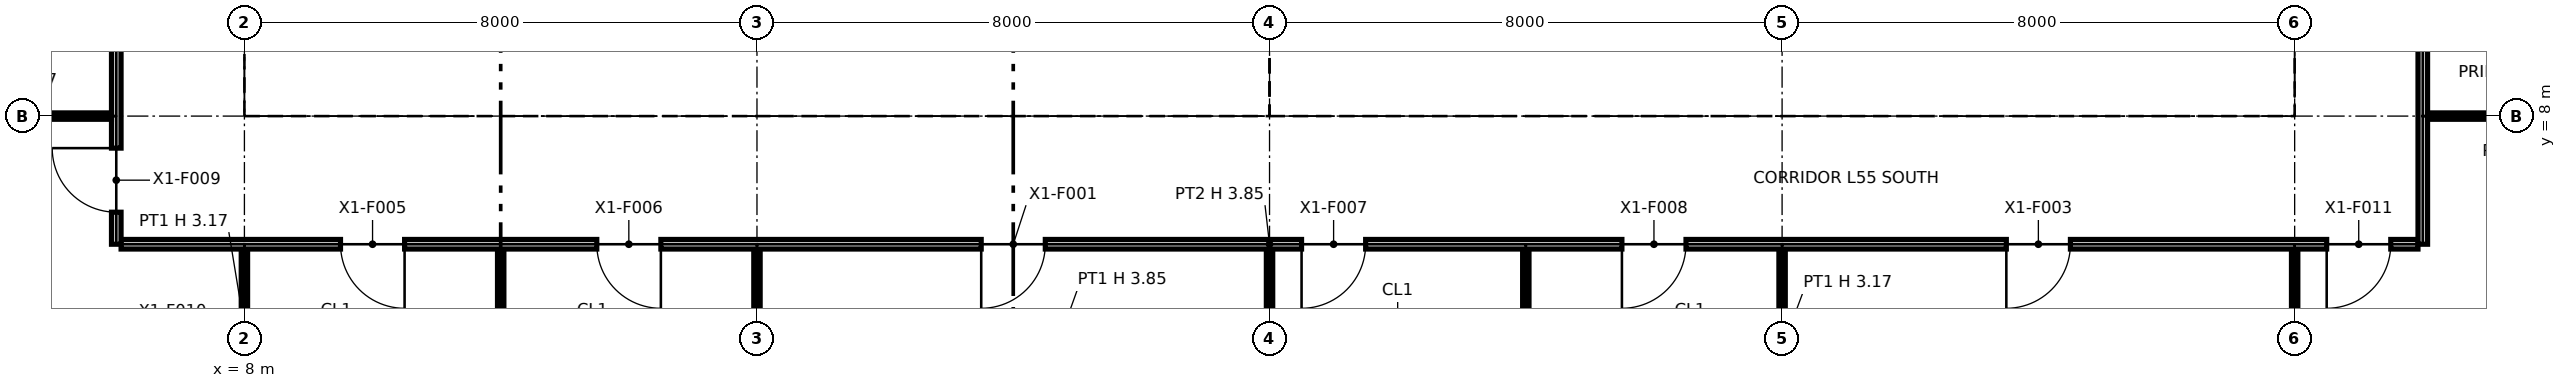
"""IFC4 building model, lengths in metres.
Left out: names, types, materials, properties, quantities, classifications, styles, units other than length and angle.
Written with IfcOpenShell. Run it as: python <this file> out.ifc"""

import sys

from ifc_helpers import new_model, si_unit, direction, frame, frame_2d, origin, origin_2d, place, context, subcontext, project, spatial, polyline, rectangle, i_section, outline, extrude, element, fill, save


model = new_model("IFC4")
c1 = context("Model", 3, precision=1e-05, world=origin(), true_north=direction((0.0, 1.0)))
c2 = subcontext(c1, "Body", "Model", "MODEL_VIEW")
j1 = project(units=[si_unit("LENGTHUNIT", "METRE"), si_unit("PLANEANGLEUNIT", "RADIAN")], contexts=[c1])
p1 = place(None, origin())
s1 = spatial("IfcSite", under=j1, at=p1, CompositionType="ELEMENT")
p2 = place(p1, origin())
s2 = spatial("IfcBuilding", under=s1, at=p2, CompositionType="ELEMENT")
p3 = place(p2, frame((0.0, 0.0, 255.0)))
s3 = spatial("IfcBuildingStorey", under=s2, at=p3, CompositionType="ELEMENT", Elevation=255.0)
for number, where, z_axis, x_axis in (
    (1, (8.0, 8.0, 0.0), (0.0, 0.0, 1.0), (1.0, 0.0, 0.0)),
    (2, (16.0, 8.0, 0.0), (0.0, 0.0, 1.0), (1.0, 0.0, 0.0)),
):
    element("IfcColumn", number, at=place(p3, frame(where, z_axis=z_axis, x_axis=x_axis)), inside=s3, PredefinedType="COLUMN", context=c2, shape_type="SweptSolid", body=[
        extrude(i_section(OverallWidth=0.371, OverallDepth=0.361, WebThickness=0.012, FlangeThickness=0.02, at=origin_2d()), origin(), (0.0, 0.0, 1.0), 3.85),
    ])
p4 = place(p3, frame((24.0, 8.0, 0.0), z_axis=(0.0, 0.0, 1.0), x_axis=(1.0, 0.0, 0.0)))
e3 = element("IfcColumn", 3, at=p4, inside=s3, PredefinedType="COLUMN", context=c2, shape_type="SweptSolid", body=[
    extrude(i_section(OverallWidth=0.373, OverallDepth=0.368, WebThickness=0.015, FlangeThickness=0.024, at=origin_2d()), origin(), (0.0, 0.0, 1.0), 3.85),
])
for number, where, z_axis, x_axis in (
    (4, (32.0, 8.0, 0.0), (0.0, 0.0, 1.0), (1.0, 0.0, 0.0)),
    (5, (40.0, 8.0, 0.0), (0.0, 0.0, 1.0), (1.0, 0.0, 0.0)),
):
    element("IfcColumn", number, at=place(p3, frame(where, z_axis=z_axis, x_axis=x_axis)), inside=s3, PredefinedType="COLUMN", context=c2, shape_type="SweptSolid", body=[
        extrude(i_section(OverallWidth=0.371, OverallDepth=0.361, WebThickness=0.012, FlangeThickness=0.02, at=origin_2d()), origin(), (0.0, 0.0, 1.0), 3.85),
    ])
p5 = place(p3, frame((8.65, 8.75, 0.0), z_axis=(0.0, 0.0, 1.0), x_axis=(1.0, 0.0, 0.0)))
e6 = element("IfcWall", 6, at=p5, inside=s3, PredefinedType="PARTITIONING", context=c2, shape_type="SweptSolid", body=[
    extrude(outline(polyline([(0.0, 0.0), (14.7, 0.0), (14.7, 3.85), (7.438, 3.85), (7.438, 3.308), (7.262, 3.308), (7.261, 3.85), (0.0, 3.85), (0.0, 0.0)])), frame((0.0, 0.1, 0.0), z_axis=(0.0, -1.0, 0.0), x_axis=(1.0, 0.0, 0.0)), (0.0, 0.0, 1.0), 0.2),
])
p6 = place(p5, frame((1.3, 0.0, 0.0)))
e7 = element("IfcOpeningElement", 7, at=p6, cuts=e6, PredefinedType="OPENING", context=c2, shape_type="SweptSolid", body=[
    extrude(rectangle(XDim=1.4, YDim=2.1, at=frame_2d((0.7, 1.05))), frame((0.0, 0.11, 0.0), z_axis=(0.0, -1.0, 0.0), x_axis=(1.0, 0.0, 0.0)), (0.0, 0.0, 1.0), 0.22),
])
p7 = place(p5, frame((4.6, 0.0, 0.0)))
e8 = element("IfcOpeningElement", 8, at=p7, cuts=e6, PredefinedType="OPENING", context=c2, shape_type="SweptSolid", body=[
    extrude(rectangle(XDim=1.4, YDim=2.1, at=frame_2d((0.7, 1.05))), frame((0.0, 0.11, 0.0), z_axis=(0.0, -1.0, 0.0), x_axis=(1.0, 0.0, 0.0)), (0.0, 0.0, 1.0), 0.22),
])
p8 = place(p5, frame((10.4, 0.0, 0.0)))
e9 = element("IfcOpeningElement", 9, at=p8, cuts=e6, PredefinedType="OPENING", context=c2, shape_type="SweptSolid", body=[
    extrude(rectangle(XDim=1.2, YDim=2.1, at=frame_2d((0.6, 1.05))), frame((0.0, 0.11, 0.0), z_axis=(0.0, -1.0, 0.0), x_axis=(1.0, 0.0, 0.0)), (0.0, 0.0, 1.0), 0.22),
])
p9 = place(p3, frame((8.75, 8.85, 0.0), z_axis=(0.0, 0.0, 1.0), x_axis=(0.0, 1.0, 0.0)))
e10 = element("IfcWall", 10, at=p9, inside=s3, PredefinedType="PARTITIONING", context=c2, shape_type="SweptSolid", body=[
    extrude(outline(polyline([(0.0, 0.0), (14.3, 0.0), (14.3, 3.85), (10.225, 3.85), (10.224, 3.44), (10.076, 3.44), (10.075, 3.85), (7.239, 3.85), (7.238, 3.308), (7.062, 3.308), (7.062, 3.85), (0.0, 3.85), (0.0, 0.0)])), frame((0.0, 0.1, 0.0), z_axis=(0.0, -1.0, 0.0), x_axis=(1.0, 0.0, 0.0)), (0.0, 0.0, 1.0), 0.2),
])
p10 = place(p9, frame((8.3, 0.0, 0.0)))
e11 = element("IfcOpeningElement", 11, at=p10, cuts=e10, PredefinedType="OPENING", context=c2, shape_type="SweptSolid", body=[
    extrude(rectangle(XDim=1.8, YDim=2.1, at=frame_2d((0.9, 1.05))), frame((0.0, 0.11, 0.0), z_axis=(0.0, -1.0, 0.0), x_axis=(1.0, 0.0, 0.0)), (0.0, 0.0, 1.0), 0.22),
])
p11 = place(p3, frame((12.4, 8.85, 0.0), z_axis=(0.0, 0.0, 1.0), x_axis=(0.0, 1.0, 0.0)))
e12 = element("IfcWall", 12, at=p11, inside=s3, PredefinedType="PARTITIONING", context=c2, shape_type="SweptSolid", body=[
    extrude(rectangle(XDim=6.85, YDim=0.2, at=frame_2d((3.425, 0.0))), origin(), (0.0, 0.0, 1.0), 3.85),
])
p12 = place(p3, frame((15.85, 8.85, 0.0), z_axis=(0.0, 0.0, 1.0), x_axis=(0.0, 1.0, 0.0)))
e13 = element("IfcWall", 13, at=p12, inside=s3, PredefinedType="PARTITIONING", context=c2, shape_type="SweptSolid", body=[
    extrude(rectangle(XDim=1.55, YDim=0.9, at=frame_2d((0.775, 0.0))), origin(), (0.0, 0.0, 1.0), 3.308),
])
p13 = place(p12, frame((0.3, 0.0, 0.0)))
e14 = element("IfcOpeningElement", 14, at=p13, cuts=e13, PredefinedType="OPENING", context=c2, shape_type="SweptSolid", body=[
    extrude(rectangle(XDim=1.1, YDim=2.1, at=frame_2d((0.55, 1.05))), frame((0.0, 0.46, 0.0), z_axis=(0.0, -1.0, 0.0), x_axis=(1.0, 0.0, 0.0)), (0.0, 0.0, 1.0), 0.92),
])
p14 = place(p3, frame((23.25, 8.85, 0.0), z_axis=(0.0, 0.0, 1.0), x_axis=(0.0, 1.0, 0.0)))
e15 = element("IfcWall", 15, at=p14, inside=s3, PredefinedType="PARTITIONING", context=c2, shape_type="SweptSolid", body=[
    extrude(outline(polyline([(0.0, 0.0), (14.3, 0.0), (14.3, 3.85), (10.225, 3.85), (10.224, 3.44), (10.076, 3.44), (10.075, 3.85), (7.239, 3.85), (7.238, 3.308), (7.062, 3.308), (7.062, 3.85), (5.225, 3.85), (5.224, 3.44), (5.076, 3.44), (5.075, 3.85), (0.0, 3.85), (0.0, 0.0)])), frame((0.0, 0.1, 0.0), z_axis=(0.0, -1.0, 0.0), x_axis=(1.0, 0.0, 0.0)), (0.0, 0.0, 1.0), 0.2),
])
p15 = place(p14, frame((8.3, 0.0, 0.0)))
e16 = element("IfcOpeningElement", 16, at=p15, cuts=e15, PredefinedType="OPENING", context=c2, shape_type="SweptSolid", body=[
    extrude(rectangle(XDim=1.8, YDim=2.1, at=frame_2d((0.9, 1.05))), frame((0.0, 0.11, 0.0), z_axis=(0.0, -1.0, 0.0), x_axis=(1.0, 0.0, 0.0)), (0.0, 0.0, 1.0), 0.22),
])
p16 = place(p3, frame((24.65, 8.75, 0.0), z_axis=(0.0, 0.0, 1.0), x_axis=(1.0, 0.0, 0.0)))
e17 = element("IfcWall", 17, at=p16, inside=s3, PredefinedType="PARTITIONING", context=c2, shape_type="SweptSolid", body=[
    extrude(outline(polyline([(0.0, 0.0), (14.7, 0.0), (14.7, 3.85), (7.438, 3.85), (7.438, 3.308), (7.262, 3.308), (7.261, 3.85), (0.0, 3.85), (0.0, 0.0)])), frame((0.0, 0.1, 0.0), z_axis=(0.0, -1.0, 0.0), x_axis=(1.0, 0.0, 0.0)), (0.0, 0.0, 1.0), 0.2),
])
p17 = place(p3, frame((24.75, 8.85, 0.0), z_axis=(0.0, 0.0, 1.0), x_axis=(0.0, 1.0, 0.0)))
e18 = element("IfcWall", 18, at=p17, inside=s3, PredefinedType="PARTITIONING", context=c2, shape_type="SweptSolid", body=[
    extrude(outline(polyline([(0.0, 0.0), (6.3, 0.0), (6.3, 3.85), (3.225, 3.85), (3.224, 3.44), (3.076, 3.44), (3.075, 3.85), (0.0, 3.85), (0.0, 0.0)])), frame((0.0, 0.1, 0.0), z_axis=(0.0, -1.0, 0.0), x_axis=(1.0, 0.0, 0.0)), (0.0, 0.0, 1.0), 0.2),
])
for number, where, z_axis, x_axis in (
    (19, (27.2, 8.85, 0.0), (0.0, 0.0, 1.0), (0.0, 1.0, 0.0)),
    (20, (29.5, 8.85, 0.0), (0.0, 0.0, 1.0), (0.0, 1.0, 0.0)),
):
    element("IfcWall", number, at=place(p3, frame(where, z_axis=z_axis, x_axis=x_axis)), inside=s3, PredefinedType="PARTITIONING", context=c2, shape_type="SweptSolid", body=[
        extrude(rectangle(XDim=2.55, YDim=0.2, at=frame_2d((1.275, 0.0))), origin(), (0.0, 0.0, 1.0), 3.85),
    ])
p18 = place(p3, frame((32.0, 8.85, 0.0), z_axis=(0.0, 0.0, 1.0), x_axis=(0.0, 1.0, 0.0)))
e21 = element("IfcWall", 21, at=p18, inside=s3, PredefinedType="PARTITIONING", context=c2, shape_type="SweptSolid", body=[
    extrude(rectangle(XDim=2.55, YDim=0.6, at=frame_2d((1.275, 0.0))), origin(), (0.0, 0.0, 1.0), 3.308),
])
for number, where, z_axis, x_axis in (
    (22, (35.6, 8.85, 0.0), (0.0, 0.0, 1.0), (0.0, 1.0, 0.0)),
    (23, (39.25, 8.85, 0.0), (0.0, 0.0, 1.0), (0.0, 1.0, 0.0)),
):
    element("IfcWall", number, at=place(p3, frame(where, z_axis=z_axis, x_axis=x_axis)), inside=s3, PredefinedType="PARTITIONING", context=c2, shape_type="SweptSolid", body=[
        extrude(rectangle(XDim=6.3, YDim=0.2, at=frame_2d((3.15, 0.0))), origin(), (0.0, 0.0, 1.0), 3.85),
    ])
p19 = place(p3, frame((40.0, 1.5, 0.0), z_axis=(0.0, 0.0, 1.0), x_axis=(0.0, 1.0, 0.0)))
e24 = element("IfcWall", 24, at=p19, inside=s3, PredefinedType="PARTITIONING", context=c2, shape_type="SweptSolid", body=[
    extrude(rectangle(XDim=4.425, YDim=0.1, at=frame_2d((2.212, 0.0))), origin(), (0.0, 0.0, 1.0), 3.172),
])
for number, where, z_axis, x_axis in (
    (25, (12.0, 2.83, 0.0), (0.0, 0.0, 1.0), (0.0, 1.0, 0.0)),
    (26, (16.0, 2.83, 0.0), (0.0, 0.0, 1.0), (0.0, 1.0, 0.0)),
    (27, (24.0, 2.83, 0.0), (0.0, 0.0, 1.0), (0.0, 1.0, 0.0)),
    (28, (28.0, 2.83, 0.0), (0.0, 0.0, 1.0), (0.0, 1.0, 0.0)),
    (29, (32.0, 2.83, 0.0), (0.0, 0.0, 1.0), (0.0, 1.0, 0.0)),
):
    element("IfcWall", number, at=place(p3, frame(where, z_axis=z_axis, x_axis=x_axis)), inside=s3, PredefinedType="PARTITIONING", context=c2, shape_type="SweptSolid", body=[
        extrude(rectangle(XDim=3.095, YDim=0.1, at=frame_2d((1.547, 0.0))), origin(), (0.0, 0.0, 1.0), 3.172),
    ])
p20 = place(p3, frame((8.0, 3.5, 0.0), z_axis=(0.0, 0.0, 1.0), x_axis=(0.0, 1.0, 0.0)))
e30 = element("IfcWall", 30, at=p20, inside=s3, PredefinedType="PARTITIONING", context=c2, shape_type="SweptSolid", body=[
    extrude(rectangle(XDim=2.425, YDim=0.1, at=frame_2d((1.212, 0.0))), origin(), (0.0, 0.0, 1.0), 3.172),
])
p21 = place(p3, frame((6.075, 6.0, 0.0), z_axis=(0.0, 0.0, 1.0), x_axis=(1.0, 0.0, 0.0)))
e31 = element("IfcWall", 31, at=p21, inside=s3, PredefinedType="PARTITIONING", context=c2, shape_type="SweptSolid", body=[
    extrude(rectangle(XDim=35.85, YDim=0.15, at=frame_2d((17.925, 0.0))), origin(), (0.0, 0.0, 1.0), 3.85),
])
p22 = place(p21, frame((14.425, 0.0, 0.0), z_axis=(0.0, 0.0, 1.0), x_axis=(-1.0, 0.0, 0.0)))
e32 = element("IfcOpeningElement", 32, at=p22, cuts=e31, PredefinedType="OPENING", context=c2, shape_type="SweptSolid", body=[
    extrude(rectangle(XDim=1.0, YDim=2.1, at=frame_2d((0.5, 1.05))), frame((0.0, 0.085, 0.0), z_axis=(0.0, -1.0, 0.0), x_axis=(1.0, 0.0, 0.0)), (0.0, 0.0, 1.0), 0.17),
])
p23 = place(p21, frame((30.425, 0.0, 0.0), z_axis=(0.0, 0.0, 1.0), x_axis=(-1.0, 0.0, 0.0)))
e33 = element("IfcOpeningElement", 33, at=p23, cuts=e31, PredefinedType="OPENING", context=c2, shape_type="SweptSolid", body=[
    extrude(rectangle(XDim=1.0, YDim=2.1, at=frame_2d((0.5, 1.05))), frame((0.0, 0.085, 0.0), z_axis=(0.0, -1.0, 0.0), x_axis=(1.0, 0.0, 0.0)), (0.0, 0.0, 1.0), 0.17),
])
p24 = place(p21, frame((4.425, 0.0, 0.0), z_axis=(0.0, 0.0, 1.0), x_axis=(-1.0, 0.0, 0.0)))
e34 = element("IfcOpeningElement", 34, at=p24, cuts=e31, PredefinedType="OPENING", context=c2, shape_type="SweptSolid", body=[
    extrude(rectangle(XDim=1.0, YDim=2.1, at=frame_2d((0.5, 1.05))), frame((0.0, 0.085, 0.0), z_axis=(0.0, -1.0, 0.0), x_axis=(1.0, 0.0, 0.0)), (0.0, 0.0, 1.0), 0.17),
])
p25 = place(p21, frame((8.425, 0.0, 0.0), z_axis=(0.0, 0.0, 1.0), x_axis=(-1.0, 0.0, 0.0)))
e35 = element("IfcOpeningElement", 35, at=p25, cuts=e31, PredefinedType="OPENING", context=c2, shape_type="SweptSolid", body=[
    extrude(rectangle(XDim=1.0, YDim=2.1, at=frame_2d((0.5, 1.05))), frame((0.0, 0.085, 0.0), z_axis=(0.0, -1.0, 0.0), x_axis=(1.0, 0.0, 0.0)), (0.0, 0.0, 1.0), 0.17),
])
p26 = place(p21, frame((19.425, 0.0, 0.0), z_axis=(0.0, 0.0, 1.0), x_axis=(-1.0, 0.0, 0.0)))
e36 = element("IfcOpeningElement", 36, at=p26, cuts=e31, PredefinedType="OPENING", context=c2, shape_type="SweptSolid", body=[
    extrude(rectangle(XDim=1.0, YDim=2.1, at=frame_2d((0.5, 1.05))), frame((0.0, 0.085, 0.0), z_axis=(0.0, -1.0, 0.0), x_axis=(1.0, 0.0, 0.0)), (0.0, 0.0, 1.0), 0.17),
])
p27 = place(p21, frame((24.425, 0.0, 0.0), z_axis=(0.0, 0.0, 1.0), x_axis=(-1.0, 0.0, 0.0)))
e37 = element("IfcOpeningElement", 37, at=p27, cuts=e31, PredefinedType="OPENING", context=c2, shape_type="SweptSolid", body=[
    extrude(rectangle(XDim=1.0, YDim=2.1, at=frame_2d((0.5, 1.05))), frame((0.0, 0.085, 0.0), z_axis=(0.0, -1.0, 0.0), x_axis=(1.0, 0.0, 0.0)), (0.0, 0.0, 1.0), 0.17),
])
p28 = place(p21, frame((35.425, 0.0, 0.0), z_axis=(0.0, 0.0, 1.0), x_axis=(-1.0, 0.0, 0.0)))
e38 = element("IfcOpeningElement", 38, at=p28, cuts=e31, PredefinedType="OPENING", context=c2, shape_type="SweptSolid", body=[
    extrude(rectangle(XDim=1.0, YDim=2.1, at=frame_2d((0.5, 1.05))), frame((0.0, 0.085, 0.0), z_axis=(0.0, -1.0, 0.0), x_axis=(1.0, 0.0, 0.0)), (0.0, 0.0, 1.0), 0.17),
])
p29 = place(p3, frame((6.0, 6.0, 0.0), z_axis=(0.0, 0.0, 1.0), x_axis=(0.0, 1.0, 0.0)))
e39 = element("IfcWall", 39, at=p29, inside=s3, PredefinedType="PARTITIONING", context=c2, shape_type="SweptSolid", body=[
    extrude(outline(polyline([(0.0, 0.0), (13.375, 0.0), (13.375, 3.85), (10.3, 3.85), (10.298, 3.172), (9.702, 3.172), (9.7, 3.85), (6.3, 3.85), (6.298, 3.172), (5.702, 3.172), (5.7, 3.85), (2.3, 3.85), (2.298, 3.172), (1.702, 3.172), (1.7, 3.85), (0.0, 3.85), (0.0, 0.0)])), frame((0.0, 0.075, 0.0), z_axis=(0.0, -1.0, 0.0), x_axis=(1.0, 0.0, 0.0)), (0.0, 0.0, 1.0), 0.15),
])
p30 = place(p29, frame((0.5, 0.0, 0.0)))
e40 = element("IfcOpeningElement", 40, at=p30, cuts=e39, PredefinedType="OPENING", context=c2, shape_type="SweptSolid", body=[
    extrude(rectangle(XDim=1.0, YDim=2.1, at=frame_2d((0.5, 1.05))), frame((0.0, 0.085, 0.0), z_axis=(0.0, -1.0, 0.0), x_axis=(1.0, 0.0, 0.0)), (0.0, 0.0, 1.0), 0.17),
])
p31 = place(p29, frame((3.5, 0.0, 0.0)))
e41 = element("IfcOpeningElement", 41, at=p31, cuts=e39, PredefinedType="OPENING", context=c2, shape_type="SweptSolid", body=[
    extrude(rectangle(XDim=1.0, YDim=2.1, at=frame_2d((0.5, 1.05))), frame((0.0, 0.085, 0.0), z_axis=(0.0, -1.0, 0.0), x_axis=(1.0, 0.0, 0.0)), (0.0, 0.0, 1.0), 0.17),
])
p32 = place(p29, frame((7.5, 0.0, 0.0)))
e42 = element("IfcOpeningElement", 42, at=p32, cuts=e39, PredefinedType="OPENING", context=c2, shape_type="SweptSolid", body=[
    extrude(rectangle(XDim=1.0, YDim=2.1, at=frame_2d((0.5, 1.05))), frame((0.0, 0.085, 0.0), z_axis=(0.0, -1.0, 0.0), x_axis=(1.0, 0.0, 0.0)), (0.0, 0.0, 1.0), 0.17),
])
p33 = place(p29, frame((11.225, 0.0, 0.0)))
e43 = element("IfcOpeningElement", 43, at=p33, cuts=e39, PredefinedType="OPENING", context=c2, shape_type="SweptSolid", body=[
    extrude(rectangle(XDim=1.0, YDim=2.1, at=frame_2d((0.5, 1.05))), frame((0.0, 0.085, 0.0), z_axis=(0.0, -1.0, 0.0), x_axis=(1.0, 0.0, 0.0)), (0.0, 0.0, 1.0), 0.17),
])
p34 = place(p3, frame((42.0, 6.0, 0.0), z_axis=(0.0, 0.0, 1.0), x_axis=(0.0, 1.0, 0.0)))
e44 = element("IfcWall", 44, at=p34, inside=s3, PredefinedType="PARTITIONING", context=c2, shape_type="SweptSolid", body=[
    extrude(outline(polyline([(0.0, 0.0), (11.925, 0.0), (11.925, 3.85), (10.3, 3.85), (10.298, 3.172), (9.702, 3.172), (9.7, 3.85), (6.3, 3.85), (6.298, 3.172), (5.702, 3.172), (5.7, 3.85), (2.3, 3.85), (2.298, 3.172), (1.702, 3.172), (1.7, 3.85), (0.0, 3.85), (0.0, 0.0)])), frame((0.0, 0.075, 0.0), z_axis=(0.0, -1.0, 0.0), x_axis=(1.0, 0.0, 0.0)), (0.0, 0.0, 1.0), 0.15),
])
p35 = place(p34, frame((4.5, 0.0, 0.0), z_axis=(0.0, 0.0, 1.0), x_axis=(-1.0, 0.0, 0.0)))
e45 = element("IfcOpeningElement", 45, at=p35, cuts=e44, PredefinedType="OPENING", context=c2, shape_type="SweptSolid", body=[
    extrude(rectangle(XDim=1.0, YDim=2.1, at=frame_2d((0.5, 1.05))), frame((0.0, 0.085, 0.0), z_axis=(0.0, -1.0, 0.0), x_axis=(1.0, 0.0, 0.0)), (0.0, 0.0, 1.0), 0.17),
])
p36 = place(p34, frame((8.5, 0.0, 0.0), z_axis=(0.0, 0.0, 1.0), x_axis=(-1.0, 0.0, 0.0)))
e46 = element("IfcOpeningElement", 46, at=p36, cuts=e44, PredefinedType="OPENING", context=c2, shape_type="SweptSolid", body=[
    extrude(rectangle(XDim=1.0, YDim=2.1, at=frame_2d((0.5, 1.05))), frame((0.0, 0.085, 0.0), z_axis=(0.0, -1.0, 0.0), x_axis=(1.0, 0.0, 0.0)), (0.0, 0.0, 1.0), 0.17),
])
p37 = place(p34, frame((11.5, 0.0, 0.0), z_axis=(0.0, 0.0, 1.0), x_axis=(-1.0, 0.0, 0.0)))
e47 = element("IfcOpeningElement", 47, at=p37, cuts=e44, PredefinedType="OPENING", context=c2, shape_type="SweptSolid", body=[
    extrude(rectangle(XDim=1.0, YDim=2.1, at=frame_2d((0.5, 1.05))), frame((0.0, 0.085, 0.0), z_axis=(0.0, -1.0, 0.0), x_axis=(1.0, 0.0, 0.0)), (0.0, 0.0, 1.0), 0.17),
])
for number, where, z_axis, x_axis in (
    (48, (2.83, 8.0, 0.0), (0.0, 0.0, 1.0), (1.0, 0.0, 0.0)),
    (49, (42.075, 8.0, 0.0), (0.0, 0.0, 1.0), (1.0, 0.0, 0.0)),
):
    element("IfcWall", number, at=place(p3, frame(where, z_axis=z_axis, x_axis=x_axis)), inside=s3, PredefinedType="PARTITIONING", context=c2, shape_type="SweptSolid", body=[
        extrude(rectangle(XDim=3.095, YDim=0.1, at=frame_2d((1.547, 0.0))), origin(), (0.0, 0.0, 1.0), 3.172),
    ])
p38 = place(p6, origin())
e50 = element("IfcDoor", 50, at=p38, inside=s3, OperationType="DOUBLE_DOOR_SINGLE_SWING", PredefinedType="NOTDEFINED", context=c2, shape_type="SweptSolid", body=[
    extrude(rectangle(XDim=1.4, YDim=2.1, at=frame_2d((0.7, 1.05))), frame((0.0, 0.025, 0.0), z_axis=(0.0, -1.0, 0.0), x_axis=(1.0, 0.0, 0.0)), (0.0, 0.0, 1.0), 0.05),
])
fill(e7, e50)
p39 = place(p7, origin())
e51 = element("IfcDoor", 51, at=p39, inside=s3, OperationType="DOUBLE_DOOR_SINGLE_SWING", PredefinedType="NOTDEFINED", context=c2, shape_type="SweptSolid", body=[
    extrude(rectangle(XDim=1.4, YDim=2.1, at=frame_2d((0.7, 1.05))), frame((0.0, 0.025, 0.0), z_axis=(0.0, -1.0, 0.0), x_axis=(1.0, 0.0, 0.0)), (0.0, 0.0, 1.0), 0.05),
])
fill(e8, e51)
p40 = place(p8, origin())
e52 = element("IfcDoor", 52, at=p40, inside=s3, OperationType="SINGLE_SWING_LEFT", PredefinedType="NOTDEFINED", context=c2, shape_type="SweptSolid", body=[
    extrude(rectangle(XDim=1.2, YDim=2.1, at=frame_2d((0.6, 1.05))), frame((0.0, 0.025, 0.0), z_axis=(0.0, -1.0, 0.0), x_axis=(1.0, 0.0, 0.0)), (0.0, 0.0, 1.0), 0.05),
])
fill(e9, e52)
p41 = place(p22, origin())
e53 = element("IfcDoor", 53, at=p41, inside=s3, OperationType="SINGLE_SWING_RIGHT", PredefinedType="DOOR", context=c2, shape_type="SweptSolid", body=[
    extrude(rectangle(XDim=1.0, YDim=2.1, at=frame_2d((0.5, 1.05))), frame((0.0, 0.025, 0.0), z_axis=(0.0, -1.0, 0.0), x_axis=(1.0, 0.0, 0.0)), (0.0, 0.0, 1.0), 0.05),
])
fill(e32, e53)
p42 = place(p23, origin())
e54 = element("IfcDoor", 54, at=p42, inside=s3, OperationType="SINGLE_SWING_RIGHT", PredefinedType="DOOR", context=c2, shape_type="SweptSolid", body=[
    extrude(rectangle(XDim=1.0, YDim=2.1, at=frame_2d((0.5, 1.05))), frame((0.0, 0.025, 0.0), z_axis=(0.0, -1.0, 0.0), x_axis=(1.0, 0.0, 0.0)), (0.0, 0.0, 1.0), 0.05),
])
fill(e33, e54)
p43 = place(p24, origin())
e55 = element("IfcDoor", 55, at=p43, inside=s3, OperationType="SINGLE_SWING_LEFT", PredefinedType="DOOR", context=c2, shape_type="SweptSolid", body=[
    extrude(rectangle(XDim=1.0, YDim=2.1, at=frame_2d((0.5, 1.05))), frame((0.0, 0.025, 0.0), z_axis=(0.0, -1.0, 0.0), x_axis=(1.0, 0.0, 0.0)), (0.0, 0.0, 1.0), 0.05),
])
fill(e34, e55)
p44 = place(p25, origin())
e56 = element("IfcDoor", 56, at=p44, inside=s3, OperationType="SINGLE_SWING_LEFT", PredefinedType="DOOR", context=c2, shape_type="SweptSolid", body=[
    extrude(rectangle(XDim=1.0, YDim=2.1, at=frame_2d((0.5, 1.05))), frame((0.0, 0.025, 0.0), z_axis=(0.0, -1.0, 0.0), x_axis=(1.0, 0.0, 0.0)), (0.0, 0.0, 1.0), 0.05),
])
fill(e35, e56)
p45 = place(p26, origin())
e57 = element("IfcDoor", 57, at=p45, inside=s3, OperationType="SINGLE_SWING_RIGHT", PredefinedType="DOOR", context=c2, shape_type="SweptSolid", body=[
    extrude(rectangle(XDim=1.0, YDim=2.1, at=frame_2d((0.5, 1.05))), frame((0.0, 0.025, 0.0), z_axis=(0.0, -1.0, 0.0), x_axis=(1.0, 0.0, 0.0)), (0.0, 0.0, 1.0), 0.05),
])
fill(e36, e57)
p46 = place(p27, origin())
e58 = element("IfcDoor", 58, at=p46, inside=s3, OperationType="SINGLE_SWING_RIGHT", PredefinedType="DOOR", context=c2, shape_type="SweptSolid", body=[
    extrude(rectangle(XDim=1.0, YDim=2.1, at=frame_2d((0.5, 1.05))), frame((0.0, 0.025, 0.0), z_axis=(0.0, -1.0, 0.0), x_axis=(1.0, 0.0, 0.0)), (0.0, 0.0, 1.0), 0.05),
])
fill(e37, e58)
p47 = place(p30, origin())
e59 = element("IfcDoor", 59, at=p47, inside=s3, OperationType="SINGLE_SWING_RIGHT", PredefinedType="DOOR", context=c2, shape_type="SweptSolid", body=[
    extrude(rectangle(XDim=1.0, YDim=2.1, at=frame_2d((0.5, 1.05))), frame((0.0, 0.025, 0.0), z_axis=(0.0, -1.0, 0.0), x_axis=(1.0, 0.0, 0.0)), (0.0, 0.0, 1.0), 0.05),
])
fill(e40, e59)
p48 = place(p28, origin())
e60 = element("IfcDoor", 60, at=p48, inside=s3, OperationType="SINGLE_SWING_RIGHT", PredefinedType="DOOR", context=c2, shape_type="SweptSolid", body=[
    extrude(rectangle(XDim=1.0, YDim=2.1, at=frame_2d((0.5, 1.05))), frame((0.0, 0.025, 0.0), z_axis=(0.0, -1.0, 0.0), x_axis=(1.0, 0.0, 0.0)), (0.0, 0.0, 1.0), 0.05),
])
fill(e38, e60)
save(model, sys.argv[1])
